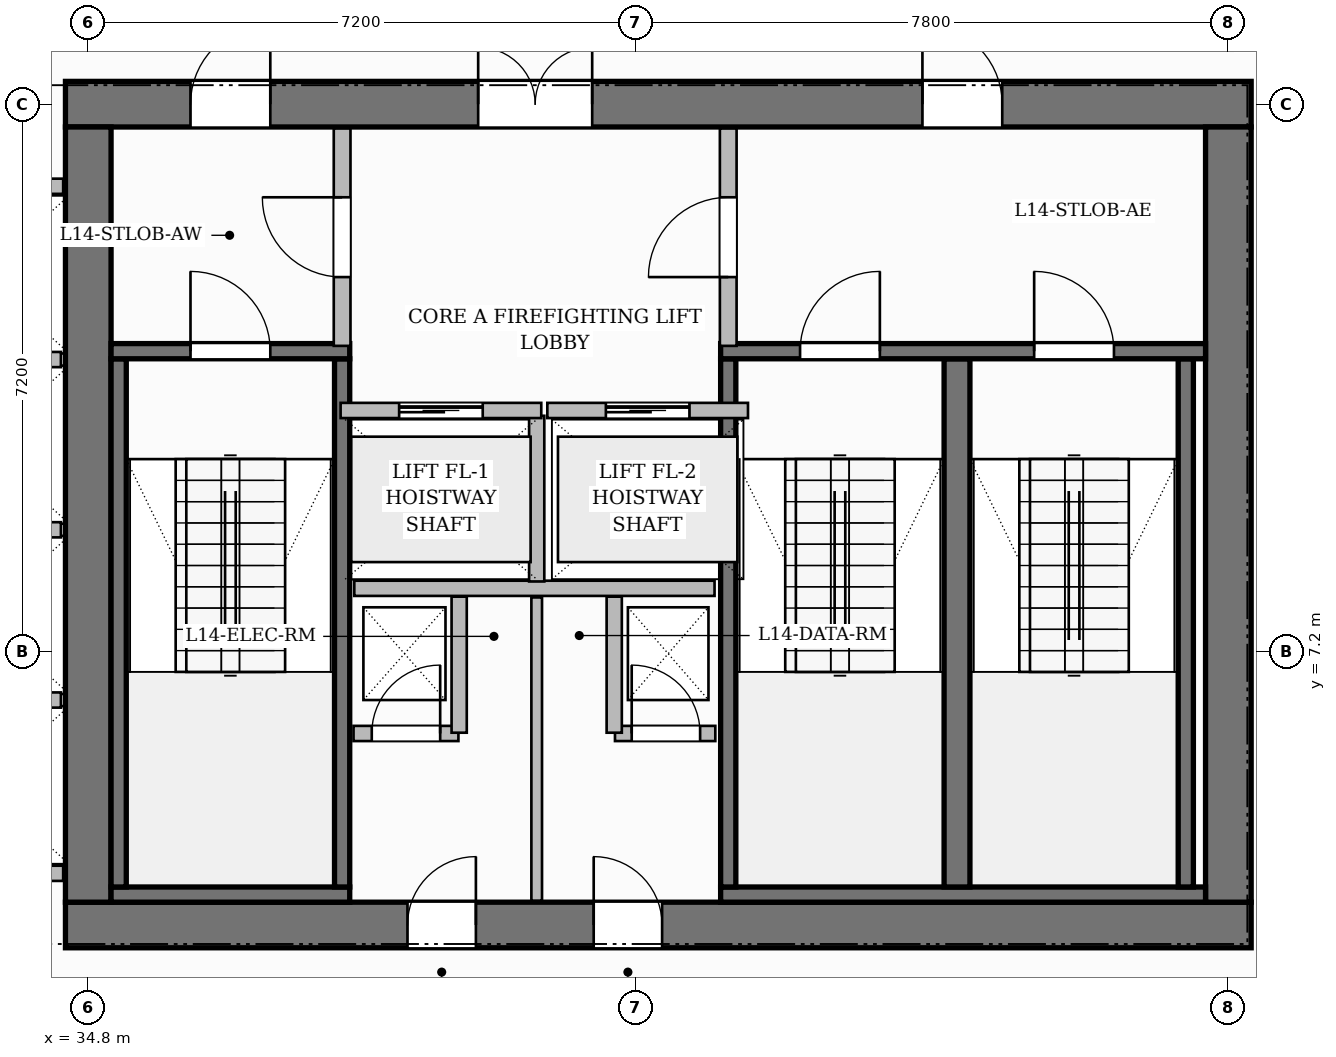
"""IFC4 building model, lengths in metres.
Left out: names, types, materials, properties, quantities, classifications, styles, units other than length and angle.
Written with IfcOpenShell. Run it as: python <this file> out.ifc"""

import sys

from ifc_helpers import new_model, si_unit, direction, frame, frame_2d, origin, place, context, subcontext, project, spatial, rectangle, extrude, source, transform, mapped, element, fill, save


model = new_model("IFC4")
c1 = context("Model", 3, precision=1e-05, world=origin(), true_north=direction((0.0, 1.0)))
c2 = subcontext(c1, "Body", "Model", "MODEL_VIEW")
j1 = project(units=[si_unit("LENGTHUNIT", "METRE"), si_unit("PLANEANGLEUNIT", "RADIAN")], contexts=[c1])
p1 = place(None, origin())
s1 = spatial("IfcSite", under=j1, at=p1, CompositionType="ELEMENT")
p2 = place(p1, origin())
s2 = spatial("IfcBuilding", under=s1, at=p2, CompositionType="ELEMENT")
p3 = place(p2, frame((0.0, 0.0, 62.0)))
s3 = spatial("IfcBuildingStorey", under=s2, at=p3, CompositionType="ELEMENT", Elevation=62.0)
p4 = place(p3, frame((34.5, 3.6, 0.0), z_axis=(0.0, 0.0, 1.0), x_axis=(1.0, 0.0, 0.0)))
e1 = element("IfcWall", 1, at=p4, inside=s3, PredefinedType="SHEAR", context=c2, shape_type="SweptSolid", body=[
    extrude(rectangle(XDim=15.6, YDim=0.6, at=frame_2d((7.8, 0.0))), origin(), (0.0, 0.0, 1.0), 3.7),
])
p5 = place(p4, frame((4.5, 0.0, 0.0)))
e2 = element("IfcOpeningElement", 2, at=p5, cuts=e1, PredefinedType="OPENING", context=c2, shape_type="SweptSolid", body=[
    extrude(rectangle(XDim=0.9, YDim=2.1, at=frame_2d((0.45, 1.05))), frame((0.0, 0.31, 0.0), z_axis=(0.0, -1.0, 0.0), x_axis=(1.0, 0.0, 0.0)), (0.0, 0.0, 1.0), 0.62),
])
p6 = place(p4, frame((6.95, 0.0, 0.0)))
e3 = element("IfcOpeningElement", 3, at=p6, cuts=e1, PredefinedType="OPENING", context=c2, shape_type="SweptSolid", body=[
    extrude(rectangle(XDim=0.9, YDim=2.1, at=frame_2d((0.45, 1.05))), frame((0.0, 0.31, 0.0), z_axis=(0.0, -1.0, 0.0), x_axis=(1.0, 0.0, 0.0)), (0.0, 0.0, 1.0), 0.62),
])
p7 = place(p3, frame((34.5, 14.4, 0.0), z_axis=(0.0, 0.0, 1.0), x_axis=(1.0, 0.0, 0.0)))
e4 = element("IfcWall", 4, at=p7, inside=s3, PredefinedType="SHEAR", context=c2, shape_type="SweptSolid", body=[
    extrude(rectangle(XDim=15.6, YDim=0.6, at=frame_2d((7.8, 0.0))), origin(), (0.0, 0.0, 1.0), 3.7),
])
p8 = place(p7, frame((5.43, 0.0, 0.0)))
e5 = element("IfcOpeningElement", 5, at=p8, cuts=e4, PredefinedType="OPENING", context=c2, shape_type="SweptSolid", body=[
    extrude(rectangle(XDim=1.5, YDim=2.2, at=frame_2d((0.75, 1.1))), frame((0.0, 0.31, 0.0), z_axis=(0.0, -1.0, 0.0), x_axis=(1.0, 0.0, 0.0)), (0.0, 0.0, 1.0), 0.62),
])
p9 = place(p7, frame((1.645, 0.0, 0.0)))
e6 = element("IfcOpeningElement", 6, at=p9, cuts=e4, PredefinedType="OPENING", context=c2, shape_type="SweptSolid", body=[
    extrude(rectangle(XDim=1.05, YDim=2.15, at=frame_2d((0.525, 1.075))), frame((0.0, 0.31, 0.0), z_axis=(0.0, -1.0, 0.0), x_axis=(1.0, 0.0, 0.0)), (0.0, 0.0, 1.0), 0.62),
])
p10 = place(p7, frame((11.275, 0.0, 0.0)))
e7 = element("IfcOpeningElement", 7, at=p10, cuts=e4, PredefinedType="OPENING", context=c2, shape_type="SweptSolid", body=[
    extrude(rectangle(XDim=1.05, YDim=2.15, at=frame_2d((0.525, 1.075))), frame((0.0, 0.31, 0.0), z_axis=(0.0, -1.0, 0.0), x_axis=(1.0, 0.0, 0.0)), (0.0, 0.0, 1.0), 0.62),
])
for number, where, z_axis, x_axis in (
    (8, (34.8, 3.9, 0.0), (0.0, 0.0, 1.0), (0.0, 1.0, 0.0)),
    (9, (49.8, 3.9, 0.0), (0.0, 0.0, 1.0), (0.0, 1.0, 0.0)),
):
    element("IfcWall", number, at=place(p3, frame(where, z_axis=z_axis, x_axis=x_axis)), inside=s3, PredefinedType="SHEAR", context=c2, shape_type="SweptSolid", body=[
        extrude(rectangle(XDim=10.2, YDim=0.6, at=frame_2d((5.1, 0.0))), origin(), (0.0, 0.0, 1.0), 3.7),
    ])
p11 = place(p3, frame((35.1, 4.0, 0.0), z_axis=(0.0, 0.0, 1.0), x_axis=(1.0, 0.0, 0.0)))
e10 = element("IfcWall", 10, at=p11, inside=s3, PredefinedType="SHEAR", context=c2, shape_type="SweptSolid", body=[
    extrude(rectangle(XDim=3.14, YDim=0.2, at=frame_2d((1.57, 0.0))), origin(), (0.0, 0.0, 1.0), 3.7),
])
for number, where, z_axis, x_axis in (
    (11, (35.2, 4.1, 0.0), (0.0, 0.0, 1.0), (0.0, 1.0, 0.0)),
    (12, (38.14, 4.1, 0.0), (0.0, 0.0, 1.0), (0.0, 1.0, 0.0)),
):
    element("IfcWall", number, at=place(p3, frame(where, z_axis=z_axis, x_axis=x_axis)), inside=s3, PredefinedType="SHEAR", context=c2, shape_type="SweptSolid", body=[
        extrude(rectangle(XDim=6.95, YDim=0.2, at=frame_2d((3.475, 0.0))), origin(), (0.0, 0.0, 1.0), 3.7),
    ])
p12 = place(p3, frame((35.1, 11.15, 0.0), z_axis=(0.0, 0.0, 1.0), x_axis=(1.0, 0.0, 0.0)))
e13 = element("IfcWall", 13, at=p12, inside=s3, PredefinedType="SHEAR", context=c2, shape_type="SweptSolid", body=[
    extrude(rectangle(XDim=3.14, YDim=0.2, at=frame_2d((1.57, 0.0))), origin(), (0.0, 0.0, 1.0), 3.7),
])
p13 = place(p12, frame((1.045, 0.0, 0.0)))
e14 = element("IfcOpeningElement", 14, at=p13, cuts=e13, PredefinedType="OPENING", context=c2, shape_type="SweptSolid", body=[
    extrude(rectangle(XDim=1.05, YDim=2.2, at=frame_2d((0.525, 1.1))), frame((0.0, 0.11, 0.0), z_axis=(0.0, -1.0, 0.0), x_axis=(1.0, 0.0, 0.0)), (0.0, 0.0, 1.0), 0.22),
])
p14 = place(p3, frame((43.12, 4.0, 0.0), z_axis=(0.0, 0.0, 1.0), x_axis=(1.0, 0.0, 0.0)))
e15 = element("IfcWall", 15, at=p14, inside=s3, PredefinedType="SHEAR", context=c2, shape_type="SweptSolid", body=[
    extrude(rectangle(XDim=6.38, YDim=0.2, at=frame_2d((3.19, 0.0))), origin(), (0.0, 0.0, 1.0), 3.7),
])
p15 = place(p3, frame((43.22, 4.1, 0.0), z_axis=(0.0, 0.0, 1.0), x_axis=(0.0, 1.0, 0.0)))
e16 = element("IfcWall", 16, at=p15, inside=s3, PredefinedType="SHEAR", context=c2, shape_type="SweptSolid", body=[
    extrude(rectangle(XDim=6.95, YDim=0.2, at=frame_2d((3.475, 0.0))), origin(), (0.0, 0.0, 1.0), 3.7),
])
p16 = place(p3, frame((46.23, 4.1, 0.0), z_axis=(0.0, 0.0, 1.0), x_axis=(0.0, 1.0, 0.0)))
e17 = element("IfcWall", 17, at=p16, inside=s3, PredefinedType="SHEAR", context=c2, shape_type="SweptSolid", body=[
    extrude(rectangle(XDim=6.95, YDim=0.34, at=frame_2d((3.475, 0.0))), origin(), (0.0, 0.0, 1.0), 3.7),
])
p17 = place(p3, frame((49.24, 4.1, 0.0), z_axis=(0.0, 0.0, 1.0), x_axis=(0.0, 1.0, 0.0)))
e18 = element("IfcWall", 18, at=p17, inside=s3, PredefinedType="SHEAR", context=c2, shape_type="SweptSolid", body=[
    extrude(rectangle(XDim=6.95, YDim=0.2, at=frame_2d((3.475, 0.0))), origin(), (0.0, 0.0, 1.0), 3.7),
])
p18 = place(p3, frame((43.12, 11.15, 0.0), z_axis=(0.0, 0.0, 1.0), x_axis=(1.0, 0.0, 0.0)))
e19 = element("IfcWall", 19, at=p18, inside=s3, PredefinedType="SHEAR", context=c2, shape_type="SweptSolid", body=[
    extrude(rectangle(XDim=6.38, YDim=0.2, at=frame_2d((3.19, 0.0))), origin(), (0.0, 0.0, 1.0), 3.7),
])
p19 = place(p18, frame((1.045, 0.0, 0.0)))
e20 = element("IfcOpeningElement", 20, at=p19, cuts=e19, PredefinedType="OPENING", context=c2, shape_type="SweptSolid", body=[
    extrude(rectangle(XDim=1.05, YDim=2.2, at=frame_2d((0.525, 1.1))), frame((0.0, 0.11, 0.0), z_axis=(0.0, -1.0, 0.0), x_axis=(1.0, 0.0, 0.0)), (0.0, 0.0, 1.0), 0.22),
])
p20 = place(p18, frame((4.125, 0.0, 0.0)))
e21 = element("IfcOpeningElement", 21, at=p20, cuts=e19, PredefinedType="OPENING", context=c2, shape_type="SweptSolid", body=[
    extrude(rectangle(XDim=1.05, YDim=2.2, at=frame_2d((0.525, 1.1))), frame((0.0, 0.11, 0.0), z_axis=(0.0, -1.0, 0.0), x_axis=(1.0, 0.0, 0.0)), (0.0, 0.0, 1.0), 0.22),
])
p21 = place(p3, frame((38.3, 8.03, 0.0), z_axis=(0.0, 0.0, 1.0), x_axis=(1.0, 0.0, 0.0)))
e22 = element("IfcWall", 22, at=p21, inside=s3, PredefinedType="PARTITIONING", context=c2, shape_type="SweptSolid", body=[
    extrude(rectangle(XDim=4.74, YDim=0.2, at=frame_2d((2.37, 0.0))), origin(), (0.0, 0.0, 1.0), 3.45),
])
p22 = place(p3, frame((40.7, 8.12, 0.0), z_axis=(0.0, 0.0, 1.0), x_axis=(0.0, 1.0, 0.0)))
e23 = element("IfcWall", 23, at=p22, inside=s3, PredefinedType="PARTITIONING", context=c2, shape_type="SweptSolid", body=[
    extrude(rectangle(XDim=2.18, YDim=0.2, at=frame_2d((1.09, 0.0))), origin(), (0.0, 0.0, 1.0), 3.45),
])
p23 = place(p3, frame((38.14, 11.22, 0.0), z_axis=(0.0, 0.0, 1.0), x_axis=(0.0, 1.0, 0.0)))
e24 = element("IfcWall", 24, at=p23, inside=s3, PredefinedType="PARTITIONING", context=c2, shape_type="SweptSolid", body=[
    extrude(rectangle(XDim=2.86, YDim=0.22, at=frame_2d((1.43, 0.0))), origin(), (0.0, 0.0, 1.0), 3.45),
])
p24 = place(p23, frame((0.905, 0.0, 0.0)))
e25 = element("IfcOpeningElement", 25, at=p24, cuts=e24, PredefinedType="OPENING", context=c2, shape_type="SweptSolid", body=[
    extrude(rectangle(XDim=1.05, YDim=2.15, at=frame_2d((0.525, 1.075))), frame((0.0, 0.12, 0.0), z_axis=(0.0, -1.0, 0.0), x_axis=(1.0, 0.0, 0.0)), (0.0, 0.0, 1.0), 0.24),
])
p25 = place(p3, frame((43.22, 11.22, 0.0), z_axis=(0.0, 0.0, 1.0), x_axis=(0.0, 1.0, 0.0)))
e26 = element("IfcWall", 26, at=p25, inside=s3, PredefinedType="PARTITIONING", context=c2, shape_type="SweptSolid", body=[
    extrude(rectangle(XDim=2.86, YDim=0.22, at=frame_2d((1.43, 0.0))), origin(), (0.0, 0.0, 1.0), 3.45),
])
p26 = place(p25, frame((0.905, 0.0, 0.0)))
e27 = element("IfcOpeningElement", 27, at=p26, cuts=e26, PredefinedType="OPENING", context=c2, shape_type="SweptSolid", body=[
    extrude(rectangle(XDim=1.05, YDim=2.15, at=frame_2d((0.525, 1.075))), frame((0.0, 0.12, 0.0), z_axis=(0.0, -1.0, 0.0), x_axis=(1.0, 0.0, 0.0)), (0.0, 0.0, 1.0), 0.24),
])
p27 = place(p3, frame((38.29, 6.12, 0.0), z_axis=(0.0, 0.0, 1.0), x_axis=(1.0, 0.0, 0.0)))
e28 = element("IfcWall", 28, at=p27, inside=s3, PredefinedType="PARTITIONING", context=c2, shape_type="SweptSolid", body=[
    extrude(rectangle(XDim=1.38, YDim=0.2, at=frame_2d((0.69, 0.0))), origin(), (0.0, 0.0, 1.0), 3.45),
])
p28 = place(p27, frame((0.24, 0.0, 0.0)))
e29 = element("IfcOpeningElement", 29, at=p28, cuts=e28, PredefinedType="OPENING", context=c2, shape_type="SweptSolid", body=[
    extrude(rectangle(XDim=0.9, YDim=2.1, at=frame_2d((0.45, 1.05))), frame((0.0, 0.11, 0.0), z_axis=(0.0, -1.0, 0.0), x_axis=(1.0, 0.0, 0.0)), (0.0, 0.0, 1.0), 0.22),
])
p29 = place(p3, frame((39.68, 6.13, 0.0), z_axis=(0.0, 0.0, 1.0), x_axis=(0.0, 1.0, 0.0)))
e30 = element("IfcWall", 30, at=p29, inside=s3, PredefinedType="PARTITIONING", context=c2, shape_type="SweptSolid", body=[
    extrude(rectangle(XDim=1.79, YDim=0.2, at=frame_2d((0.895, 0.0))), origin(), (0.0, 0.0, 1.0), 3.45),
])
p30 = place(p3, frame((41.73, 6.12, 0.0), z_axis=(0.0, 0.0, 1.0), x_axis=(1.0, 0.0, 0.0)))
e31 = element("IfcWall", 31, at=p30, inside=s3, PredefinedType="PARTITIONING", context=c2, shape_type="SweptSolid", body=[
    extrude(rectangle(XDim=1.32, YDim=0.2, at=frame_2d((0.66, 0.0))), origin(), (0.0, 0.0, 1.0), 3.45),
])
p31 = place(p30, frame((0.22, 0.0, 0.0)))
e32 = element("IfcOpeningElement", 32, at=p31, cuts=e31, PredefinedType="OPENING", context=c2, shape_type="SweptSolid", body=[
    extrude(rectangle(XDim=0.9, YDim=2.1, at=frame_2d((0.45, 1.05))), frame((0.0, 0.11, 0.0), z_axis=(0.0, -1.0, 0.0), x_axis=(1.0, 0.0, 0.0)), (0.0, 0.0, 1.0), 0.22),
])
p32 = place(p3, frame((41.72, 6.13, 0.0), z_axis=(0.0, 0.0, 1.0), x_axis=(0.0, 1.0, 0.0)))
e33 = element("IfcWall", 33, at=p32, inside=s3, PredefinedType="PARTITIONING", context=c2, shape_type="SweptSolid", body=[
    extrude(rectangle(XDim=1.79, YDim=0.2, at=frame_2d((0.895, 0.0))), origin(), (0.0, 0.0, 1.0), 3.45),
])
p33 = place(p3, frame((40.7, 3.92, 0.0), z_axis=(0.0, 0.0, 1.0), x_axis=(0.0, 1.0, 0.0)))
e34 = element("IfcWall", 34, at=p33, inside=s3, PredefinedType="PARTITIONING", context=c2, shape_type="SweptSolid", body=[
    extrude(rectangle(XDim=3.99, YDim=0.14, at=frame_2d((1.995, 0.0))), origin(), (0.0, 0.0, 1.0), 3.45),
])
for number, where, z_axis, x_axis in (
    (35, (32.16, 4.28, 0.0), (0.0, 0.0, 1.0), (1.0, 0.0, 0.0)),
    (36, (32.16, 13.32, 0.0), (0.0, 0.0, 1.0), (1.0, 0.0, 0.0)),
):
    element("IfcWall", number, at=place(p3, frame(where, z_axis=z_axis, x_axis=x_axis)), inside=s3, PredefinedType="PARTITIONING", context=c2, shape_type="SweptSolid", body=[
        extrude(rectangle(XDim=2.31, YDim=0.2, at=frame_2d((1.155, 0.0))), origin(), (0.0, 0.0, 1.0), 3.45),
    ])
for number, where, z_axis, x_axis in (
    (37, (32.26, 6.56, 0.0), (0.0, 0.0, 1.0), (1.0, 0.0, 0.0)),
    (38, (32.26, 8.8, 0.0), (0.0, 0.0, 1.0), (1.0, 0.0, 0.0)),
    (39, (32.26, 11.04, 0.0), (0.0, 0.0, 1.0), (1.0, 0.0, 0.0)),
):
    element("IfcWall", number, at=place(p3, frame(where, z_axis=z_axis, x_axis=x_axis)), inside=s3, PredefinedType="PARTITIONING", context=c2, shape_type="SweptSolid", body=[
        extrude(rectangle(XDim=2.18, YDim=0.2, at=frame_2d((1.09, 0.0))), origin(), (0.0, 0.0, 1.0), 3.45),
    ])
p34 = place(p3, frame((38.12, 10.37, 0.0), z_axis=(0.0, 0.0, 1.0), x_axis=(1.0, 0.0, 0.0)))
e40 = element("IfcWall", 40, at=p34, inside=s3, PredefinedType="PARTITIONING", context=c2, shape_type="SweptSolid", body=[
    extrude(rectangle(XDim=2.64, YDim=0.2, at=frame_2d((1.32, 0.0))), origin(), (0.0, 0.0, 1.0), 3.45),
])
p35 = place(p34, frame((0.77, 0.0, 0.0)))
e41 = element("IfcOpeningElement", 41, at=p35, cuts=e40, PredefinedType="OPENING", context=c2, shape_type="SweptSolid", body=[
    extrude(rectangle(XDim=1.1, YDim=2.2, at=frame_2d((0.55, 1.1))), frame((0.0, 0.11, 0.0), z_axis=(0.0, -1.0, 0.0), x_axis=(1.0, 0.0, 0.0)), (0.0, 0.0, 1.0), 0.22),
])
p36 = place(p3, frame((40.84, 10.37, 0.0), z_axis=(0.0, 0.0, 1.0), x_axis=(1.0, 0.0, 0.0)))
e42 = element("IfcWall", 42, at=p36, inside=s3, PredefinedType="PARTITIONING", context=c2, shape_type="SweptSolid", body=[
    extrude(rectangle(XDim=2.64, YDim=0.2, at=frame_2d((1.32, 0.0))), origin(), (0.0, 0.0, 1.0), 3.45),
])
p37 = place(p36, frame((0.77, 0.0, 0.0)))
e43 = element("IfcOpeningElement", 43, at=p37, cuts=e42, PredefinedType="OPENING", context=c2, shape_type="SweptSolid", body=[
    extrude(rectangle(XDim=1.1, YDim=2.2, at=frame_2d((0.55, 1.1))), frame((0.0, 0.11, 0.0), z_axis=(0.0, -1.0, 0.0), x_axis=(1.0, 0.0, 0.0)), (0.0, 0.0, 1.0), 0.22),
])
m1 = source(origin(), c2, "Body", "SweptSolid", [
    extrude(rectangle(XDim=1.05, YDim=2.2, at=frame_2d((0.525, 1.1))), frame((0.0, 0.025, 0.0), z_axis=(0.0, -1.0, 0.0), x_axis=(1.0, 0.0, 0.0)), (0.0, 0.0, 1.0), 0.05),
])
p38 = place(p13, origin())
e44 = element("IfcDoor", 44, at=p38, inside=s3, OperationType="SINGLE_SWING_LEFT", PredefinedType="DOOR", context=c2, shape_type="MappedRepresentation", body=[
    mapped(m1, transform((0.0, 0.0, 0.0), scale=1.0)),
])
fill(e14, e44)
p39 = place(p19, origin())
e45 = element("IfcDoor", 45, at=p39, inside=s3, OperationType="SINGLE_SWING_RIGHT", PredefinedType="DOOR", context=c2, shape_type="MappedRepresentation", body=[
    mapped(m1, transform((0.0, 0.0, 0.0), scale=1.0)),
])
fill(e20, e45)
p40 = place(p20, origin())
e46 = element("IfcDoor", 46, at=p40, inside=s3, OperationType="SINGLE_SWING_LEFT", PredefinedType="DOOR", context=c2, shape_type="MappedRepresentation", body=[
    mapped(m1, transform((0.0, 0.0, 0.0), scale=1.0)),
])
fill(e21, e46)
m2 = source(origin(), c2, "Body", "SweptSolid", [
    extrude(rectangle(XDim=1.05, YDim=2.15, at=frame_2d((0.525, 1.075))), frame((0.0, 0.025, 0.0), z_axis=(0.0, -1.0, 0.0), x_axis=(1.0, 0.0, 0.0)), (0.0, 0.0, 1.0), 0.05),
])
p41 = place(p24, origin())
e47 = element("IfcDoor", 47, at=p41, inside=s3, OperationType="SINGLE_SWING_RIGHT", PredefinedType="DOOR", context=c2, shape_type="MappedRepresentation", body=[
    mapped(m2, transform((0.0, 0.0, 0.0), scale=1.0)),
])
fill(e25, e47)
p42 = place(p26, origin())
e48 = element("IfcDoor", 48, at=p42, inside=s3, OperationType="SINGLE_SWING_LEFT", PredefinedType="DOOR", context=c2, shape_type="MappedRepresentation", body=[
    mapped(m2, transform((0.0, 0.0, 0.0), scale=1.0)),
])
fill(e27, e48)
m3 = source(origin(), c2, "Body", "SweptSolid", [
    extrude(rectangle(XDim=1.5, YDim=2.2, at=frame_2d((0.75, 1.1))), frame((0.0, 0.025, 0.0), z_axis=(0.0, -1.0, 0.0), x_axis=(1.0, 0.0, 0.0)), (0.0, 0.0, 1.0), 0.05),
])
p43 = place(p8, origin())
e49 = element("IfcDoor", 49, at=p43, inside=s3, OperationType="DOUBLE_DOOR_SINGLE_SWING", PredefinedType="DOOR", context=c2, shape_type="MappedRepresentation", body=[
    mapped(m3, transform((0.0, 0.0, 0.0), scale=1.0)),
])
fill(e5, e49)
p44 = place(p9, origin())
e50 = element("IfcDoor", 50, at=p44, inside=s3, OperationType="SINGLE_SWING_RIGHT", PredefinedType="DOOR", context=c2, shape_type="MappedRepresentation", body=[
    mapped(m2, transform((0.0, 0.0, 0.0), scale=1.0)),
])
fill(e6, e50)
p45 = place(p10, origin())
e51 = element("IfcDoor", 51, at=p45, inside=s3, OperationType="SINGLE_SWING_LEFT", PredefinedType="DOOR", context=c2, shape_type="MappedRepresentation", body=[
    mapped(m2, transform((0.0, 0.0, 0.0), scale=1.0)),
])
fill(e7, e51)
m4 = source(origin(), c2, "Body", "SweptSolid", [
    extrude(rectangle(XDim=0.9, YDim=2.1, at=frame_2d((0.45, 1.05))), frame((0.0, 0.025, 0.0), z_axis=(0.0, -1.0, 0.0), x_axis=(1.0, 0.0, 0.0)), (0.0, 0.0, 1.0), 0.05),
])
p46 = place(p28, origin())
e52 = element("IfcDoor", 52, at=p46, inside=s3, OperationType="SINGLE_SWING_RIGHT", PredefinedType="DOOR", context=c2, shape_type="MappedRepresentation", body=[
    mapped(m4, transform((0.0, 0.0, 0.0), scale=1.0)),
])
fill(e29, e52)
p47 = place(p31, origin())
e53 = element("IfcDoor", 53, at=p47, inside=s3, OperationType="SINGLE_SWING_LEFT", PredefinedType="DOOR", context=c2, shape_type="MappedRepresentation", body=[
    mapped(m4, transform((0.0, 0.0, 0.0), scale=1.0)),
])
fill(e32, e53)
p48 = place(p5, origin())
e54 = element("IfcDoor", 54, at=p48, inside=s3, OperationType="SINGLE_SWING_RIGHT", PredefinedType="DOOR", context=c2, shape_type="MappedRepresentation", body=[
    mapped(m4, transform((0.0, 0.0, 0.0), scale=1.0)),
])
fill(e2, e54)
p49 = place(p6, origin())
e55 = element("IfcDoor", 55, at=p49, inside=s3, OperationType="SINGLE_SWING_LEFT", PredefinedType="DOOR", context=c2, shape_type="MappedRepresentation", body=[
    mapped(m4, transform((0.0, 0.0, 0.0), scale=1.0)),
])
fill(e3, e55)
m5 = source(origin(), c2, "Body", "SweptSolid", [
    extrude(rectangle(XDim=1.1, YDim=2.2, at=frame_2d((0.55, 1.1))), frame((0.0, 0.025, 0.0), z_axis=(0.0, -1.0, 0.0), x_axis=(1.0, 0.0, 0.0)), (0.0, 0.0, 1.0), 0.05),
])
p50 = place(p35, origin())
e56 = element("IfcDoor", 56, at=p50, inside=s3, OperationType="SLIDING_TO_LEFT", PredefinedType="DOOR", context=c2, shape_type="MappedRepresentation", body=[
    mapped(m5, transform((0.0, 0.0, 0.0), scale=1.0)),
])
fill(e41, e56)
p51 = place(p37, origin())
e57 = element("IfcDoor", 57, at=p51, inside=s3, OperationType="SLIDING_TO_LEFT", PredefinedType="DOOR", context=c2, shape_type="MappedRepresentation", body=[
    mapped(m5, transform((0.0, 0.0, 0.0), scale=1.0)),
])
fill(e43, e57)
save(model, sys.argv[1])
